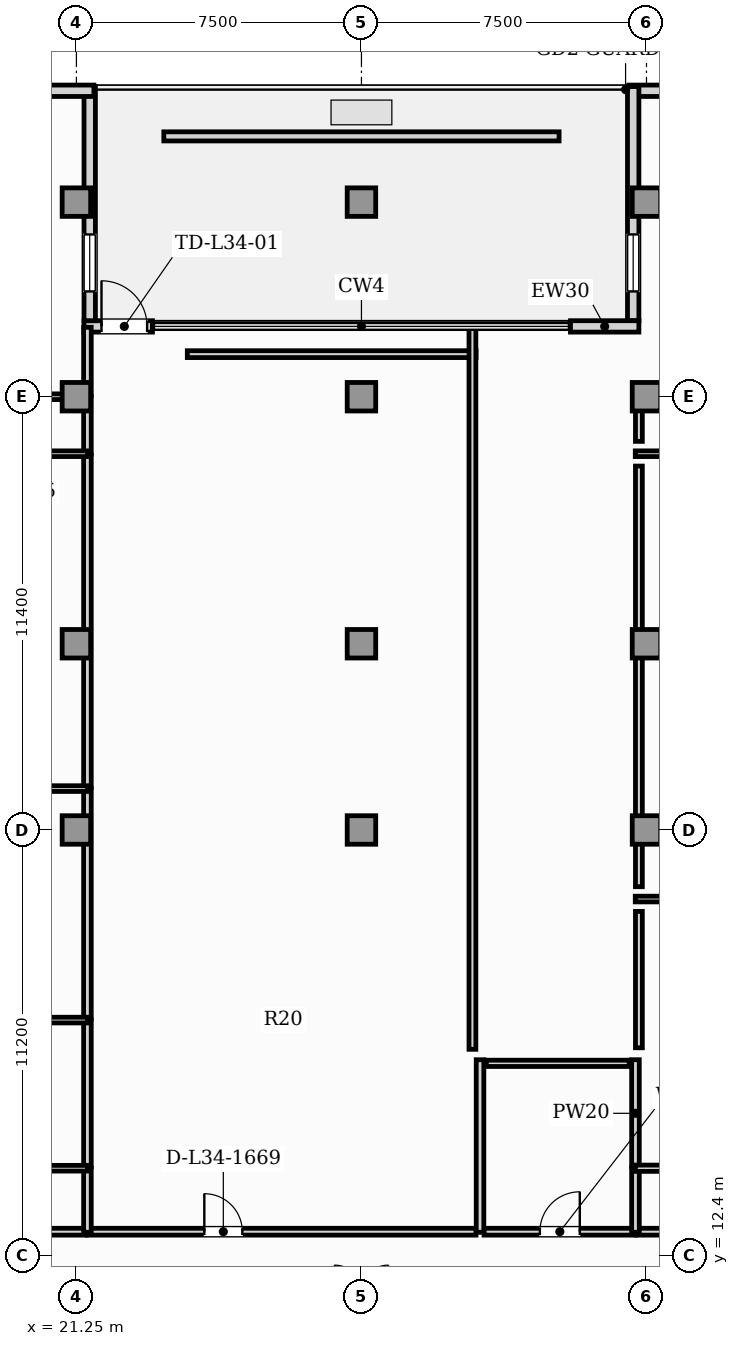
"""IFC4 building model, lengths in metres.
Left out: names, types, materials, properties, quantities, classifications, styles, units other than length and angle.
Written with IfcOpenShell. Run it as: python <this file> out.ifc"""

import sys

from ifc_helpers import new_model, si_unit, direction, frame, frame_2d, origin, origin_2d, place, context, subcontext, project, spatial, rectangle, extrude, element, fill, save


model = new_model("IFC4")
c1 = context("Model", 3, precision=1e-05, world=origin(), true_north=direction((0.0, 1.0)))
c2 = subcontext(c1, "Body", "Model", "MODEL_VIEW")
j1 = project(units=[si_unit("LENGTHUNIT", "METRE"), si_unit("PLANEANGLEUNIT", "RADIAN")], contexts=[c1])
p1 = place(None, origin())
s1 = spatial("IfcSite", under=j1, at=p1, CompositionType="ELEMENT")
p2 = place(p1, origin())
s2 = spatial("IfcBuilding", under=s1, at=p2, CompositionType="ELEMENT")
p3 = place(p2, frame((0.0, 0.0, 140.15)))
s3 = spatial("IfcBuildingStorey", under=s2, at=p3, CompositionType="ELEMENT", Elevation=140.15)
for number, where, z_axis, x_axis in (
    (1, (21.25, 23.6, 0.0), (0.0, 0.0, 1.0), (1.0, 0.0, 0.0)),
    (2, (28.75, 23.6, 0.0), (0.0, 0.0, 1.0), (1.0, 0.0, 0.0)),
    (3, (36.25, 23.6, 0.0), (0.0, 0.0, 1.0), (1.0, 0.0, 0.0)),
    (4, (21.25, 28.5, 0.0), (0.0, 0.0, 1.0), (1.0, 0.0, 0.0)),
    (5, (28.75, 28.5, 0.0), (0.0, 0.0, 1.0), (1.0, 0.0, 0.0)),
    (6, (36.25, 28.5, 0.0), (0.0, 0.0, 1.0), (1.0, 0.0, 0.0)),
    (7, (21.25, 40.12, 0.0), (0.0, 0.0, 1.0), (1.0, 0.0, 0.0)),
    (8, (28.75, 40.12, 0.0), (0.0, 0.0, 1.0), (1.0, 0.0, 0.0)),
    (9, (36.25, 40.12, 0.0), (0.0, 0.0, 1.0), (1.0, 0.0, 0.0)),
    (10, (21.25, 35.0, 0.0), (0.0, 0.0, 1.0), (1.0, 0.0, 0.0)),
    (11, (28.75, 35.0, 0.0), (0.0, 0.0, 1.0), (1.0, 0.0, 0.0)),
    (12, (36.25, 35.0, 0.0), (0.0, 0.0, 1.0), (1.0, 0.0, 0.0)),
):
    element("IfcColumn", number, at=place(p3, frame(where, z_axis=z_axis, x_axis=x_axis)), inside=s3, PredefinedType="COLUMN", context=c2, shape_type="SweptSolid", body=[
        extrude(rectangle(XDim=0.75, YDim=0.75, at=origin_2d()), origin(), (0.0, 0.0, 1.0), 5.05),
    ])
p4 = place(p3, frame((36.99, 43.05, 0.0), z_axis=(0.0, 0.0, 1.0), x_axis=(-1.0, 0.0, 0.0)))
e13 = element("IfcWall", 13, at=p4, inside=s3, PredefinedType="SOLIDWALL", context=c2, shape_type="SweptSolid", body=[
    extrude(rectangle(XDim=1.2, YDim=0.3, at=frame_2d((0.6, 0.0))), origin(), (0.0, 0.0, 1.0), 4.83),
])
p5 = place(p3, frame((35.9, 43.16, 0.0), z_axis=(0.0, 0.0, 1.0), x_axis=(0.0, -1.0, 0.0)))
e14 = element("IfcWall", 14, at=p5, inside=s3, PredefinedType="SOLIDWALL", context=c2, shape_type="SweptSolid", body=[
    extrude(rectangle(XDim=6.16, YDim=0.3, at=frame_2d((3.08, 0.0))), origin(), (0.0, 0.0, 1.0), 4.83),
])
p6 = place(p5, frame((3.89, 0.0, 0.9)))
e15 = element("IfcOpeningElement", 15, at=p6, cuts=e14, PredefinedType="OPENING", context=c2, shape_type="SweptSolid", body=[
    extrude(rectangle(XDim=1.5, YDim=1.95, at=frame_2d((0.75, 0.975))), frame((0.0, 0.16, 0.0), z_axis=(0.0, -1.0, 0.0), x_axis=(1.0, 0.0, 0.0)), (0.0, 0.0, 1.0), 0.32),
])
p7 = place(p3, frame((21.45, 36.85, 0.0), z_axis=(0.0, 0.0, 1.0), x_axis=(1.0, 0.0, 0.0)))
e16 = element("IfcWall", 16, at=p7, inside=s3, PredefinedType="SOLIDWALL", context=c2, shape_type="SweptSolid", body=[
    extrude(rectangle(XDim=1.8, YDim=0.3, at=frame_2d((0.9, 0.0))), origin(), (0.0, 0.0, 1.0), 4.83),
])
p8 = place(p7, frame((0.46, 0.0, 0.0)))
e17 = element("IfcOpeningElement", 17, at=p8, cuts=e16, PredefinedType="OPENING", context=c2, shape_type="SweptSolid", body=[
    extrude(rectangle(XDim=1.2, YDim=2.2, at=frame_2d((0.6, 1.1))), frame((0.0, 0.16, 0.0), z_axis=(0.0, -1.0, 0.0), x_axis=(1.0, 0.0, 0.0)), (0.0, 0.0, 1.0), 0.32),
])
p9 = place(p3, frame((34.25, 36.85, 0.0), z_axis=(0.0, 0.0, 1.0), x_axis=(1.0, 0.0, 0.0)))
e18 = element("IfcWall", 18, at=p9, inside=s3, PredefinedType="SOLIDWALL", context=c2, shape_type="SweptSolid", body=[
    extrude(rectangle(XDim=1.8, YDim=0.3, at=frame_2d((0.9, 0.0))), origin(), (0.0, 0.0, 1.0), 4.83),
])
p10 = place(p3, frame((21.6, 37.0, 0.0), z_axis=(0.0, 0.0, 1.0), x_axis=(0.0, 1.0, 0.0)))
e19 = element("IfcWall", 19, at=p10, inside=s3, PredefinedType="SOLIDWALL", context=c2, shape_type="SweptSolid", body=[
    extrude(rectangle(XDim=6.16, YDim=0.3, at=frame_2d((3.08, 0.0))), origin(), (0.0, 0.0, 1.0), 4.83),
])
p11 = place(p10, frame((0.77, 0.0, 0.9)))
e20 = element("IfcOpeningElement", 20, at=p11, cuts=e19, PredefinedType="OPENING", context=c2, shape_type="SweptSolid", body=[
    extrude(rectangle(XDim=1.5, YDim=1.95, at=frame_2d((0.75, 0.975))), frame((0.0, 0.16, 0.0), z_axis=(0.0, -1.0, 0.0), x_axis=(1.0, 0.0, 0.0)), (0.0, 0.0, 1.0), 0.32),
])
p12 = place(p3, frame((21.71, 43.05, 0.0), z_axis=(0.0, 0.0, 1.0), x_axis=(-1.0, 0.0, 0.0)))
e21 = element("IfcWall", 21, at=p12, inside=s3, PredefinedType="SOLIDWALL", context=c2, shape_type="SweptSolid", body=[
    extrude(rectangle(XDim=15.87, YDim=0.3, at=frame_2d((7.935, 0.0))), origin(), (0.0, 0.0, 1.0), 4.83),
])
p13 = place(p12, frame((13.6, 0.0, 0.9)))
e22 = element("IfcOpeningElement", 22, at=p13, cuts=e21, PredefinedType="OPENING", context=c2, shape_type="SweptSolid", body=[
    extrude(rectangle(XDim=1.5, YDim=1.95, at=frame_2d((0.75, 0.975))), frame((0.0, 0.16, 0.0), z_axis=(0.0, -1.0, 0.0), x_axis=(1.0, 0.0, 0.0)), (0.0, 0.0, 1.0), 0.32),
])
p14 = place(p12, frame((9.699, 0.0, 0.9)))
e23 = element("IfcOpeningElement", 23, at=p14, cuts=e21, PredefinedType="OPENING", context=c2, shape_type="SweptSolid", body=[
    extrude(rectangle(XDim=1.5, YDim=1.95, at=frame_2d((0.75, 0.975))), frame((0.0, 0.16, 0.0), z_axis=(0.0, -1.0, 0.0), x_axis=(1.0, 0.0, 0.0)), (0.0, 0.0, 1.0), 0.32),
])
p15 = place(p12, frame((5.218, 0.0, 0.9)))
e24 = element("IfcOpeningElement", 24, at=p15, cuts=e21, PredefinedType="OPENING", context=c2, shape_type="SweptSolid", body=[
    extrude(rectangle(XDim=1.5, YDim=1.95, at=frame_2d((0.75, 0.975))), frame((0.0, 0.16, 0.0), z_axis=(0.0, -1.0, 0.0), x_axis=(1.0, 0.0, 0.0)), (0.0, 0.0, 1.0), 0.32),
])
p16 = place(p3, frame((23.55, 41.85, 0.0), z_axis=(0.0, 0.0, 1.0), x_axis=(1.0, 0.0, 0.0)))
e25 = element("IfcWall", 25, at=p16, inside=s3, PredefinedType="PARAPET", context=c2, shape_type="SweptSolid", body=[
    extrude(rectangle(XDim=10.4, YDim=0.24, at=frame_2d((5.2, 0.0))), origin(), (0.0, 0.0, 1.0), 0.55),
])
p17 = place(p3, frame((21.535, 13.03, 0.0), z_axis=(0.0, 0.0, 1.0), x_axis=(1.0, 0.0, 0.0)))
e26 = element("IfcWall", 26, at=p17, inside=s3, PredefinedType="PARTITIONING", context=c2, shape_type="SweptSolid", body=[
    extrude(rectangle(XDim=10.23, YDim=0.18, at=frame_2d((5.115, 0.0))), origin(), (0.0, 0.0, 1.0), 4.83),
])
p18 = place(p17, frame((3.081, 0.0, 0.0)))
e27 = element("IfcOpeningElement", 27, at=p18, cuts=e26, PredefinedType="OPENING", context=c2, shape_type="SweptSolid", body=[
    extrude(rectangle(XDim=1.0, YDim=2.15, at=frame_2d((0.5, 1.075))), frame((0.0, 0.1, 0.0), z_axis=(0.0, -1.0, 0.0), x_axis=(1.0, 0.0, 0.0)), (0.0, 0.0, 1.0), 0.2),
])
p19 = place(p3, frame((31.975, 13.03, 0.0), z_axis=(0.0, 0.0, 1.0), x_axis=(1.0, 0.0, 0.0)))
e28 = element("IfcWall", 28, at=p19, inside=s3, PredefinedType="PARTITIONING", context=c2, shape_type="SweptSolid", body=[
    extrude(rectangle(XDim=3.99, YDim=0.18, at=frame_2d((1.995, 0.0))), origin(), (0.0, 0.0, 1.0), 4.83),
])
p20 = place(p19, frame((1.47, 0.0, 0.0)))
e29 = element("IfcOpeningElement", 29, at=p20, cuts=e28, PredefinedType="OPENING", context=c2, shape_type="SweptSolid", body=[
    extrude(rectangle(XDim=1.05, YDim=2.15, at=frame_2d((0.525, 1.075))), frame((0.0, 0.1, 0.0), z_axis=(0.0, -1.0, 0.0), x_axis=(1.0, 0.0, 0.0)), (0.0, 0.0, 1.0), 0.2),
])
p21 = place(p3, frame((15.085, 13.03, 0.0), z_axis=(0.0, 0.0, 1.0), x_axis=(1.0, 0.0, 0.0)))
e30 = element("IfcWall", 30, at=p21, inside=s3, PredefinedType="PARTITIONING", context=c2, shape_type="SweptSolid", body=[
    extrude(rectangle(XDim=6.42, YDim=0.18, at=frame_2d((3.21, 0.0))), origin(), (0.0, 0.0, 1.0), 4.83),
])
p22 = place(p3, frame((35.995, 13.03, 0.0), z_axis=(0.0, 0.0, 1.0), x_axis=(1.0, 0.0, 0.0)))
e31 = element("IfcWall", 31, at=p22, inside=s3, PredefinedType="PARTITIONING", context=c2, shape_type="SweptSolid", body=[
    extrude(rectangle(XDim=6.495, YDim=0.18, at=frame_2d((3.248, 0.0))), origin(), (0.0, 0.0, 1.0), 4.83),
])
p23 = place(p3, frame((31.87, 13.015, 0.0), z_axis=(0.0, 0.0, 1.0), x_axis=(0.0, 1.0, 0.0)))
e32 = element("IfcWall", 32, at=p23, inside=s3, PredefinedType="PARTITIONING", context=c2, shape_type="SweptSolid", body=[
    extrude(rectangle(XDim=4.54, YDim=0.2, at=frame_2d((2.27, 0.0))), origin(), (0.0, 0.0, 1.0), 4.83),
])
p24 = place(p3, frame((21.54, 33.495, 0.0), z_axis=(0.0, 0.0, 1.0), x_axis=(0.0, 1.0, 0.0)))
e33 = element("IfcWall", 33, at=p24, inside=s3, PredefinedType="PARTITIONING", context=c2, shape_type="SweptSolid", body=[
    extrude(rectangle(XDim=1.51, YDim=0.2, at=frame_2d((0.755, 0.0))), origin(), (0.0, 0.0, 1.0), 4.83),
])
p25 = place(p3, frame((21.54, 13.015, 0.0), z_axis=(0.0, 0.0, 1.0), x_axis=(0.0, 1.0, 0.0)))
e34 = element("IfcWall", 34, at=p25, inside=s3, PredefinedType="PARTITIONING", context=c2, shape_type="SweptSolid", body=[
    extrude(rectangle(XDim=1.69, YDim=0.2, at=frame_2d((0.845, 0.0))), origin(), (0.0, 0.0, 1.0), 4.83),
])
p26 = place(p3, frame((21.54, 14.735, 0.0), z_axis=(0.0, 0.0, 1.0), x_axis=(0.0, 1.0, 0.0)))
e35 = element("IfcWall", 35, at=p26, inside=s3, PredefinedType="PARTITIONING", context=c2, shape_type="SweptSolid", body=[
    extrude(rectangle(XDim=3.868, YDim=0.2, at=frame_2d((1.934, 0.0))), origin(), (0.0, 0.0, 1.0), 4.83),
])
p27 = place(p3, frame((21.54, 18.633, 0.0), z_axis=(0.0, 0.0, 1.0), x_axis=(0.0, 1.0, 0.0)))
e36 = element("IfcWall", 36, at=p27, inside=s3, PredefinedType="PARTITIONING", context=c2, shape_type="SweptSolid", body=[
    extrude(rectangle(XDim=6.061, YDim=0.2, at=frame_2d((3.03, 0.0))), origin(), (0.0, 0.0, 1.0), 4.83),
])
p28 = place(p3, frame((21.54, 24.724, 0.0), z_axis=(0.0, 0.0, 1.0), x_axis=(0.0, 1.0, 0.0)))
e37 = element("IfcWall", 37, at=p28, inside=s3, PredefinedType="PARTITIONING", context=c2, shape_type="SweptSolid", body=[
    extrude(rectangle(XDim=8.741, YDim=0.2, at=frame_2d((4.371, 0.0))), origin(), (0.0, 0.0, 1.0), 4.83),
])
p29 = place(p3, frame((21.54, 35.035, 0.0), z_axis=(0.0, 0.0, 1.0), x_axis=(0.0, 1.0, 0.0)))
e38 = element("IfcWall", 38, at=p29, inside=s3, PredefinedType="PARTITIONING", context=c2, shape_type="SweptSolid", body=[
    extrude(rectangle(XDim=1.792, YDim=0.2, at=frame_2d((0.896, 0.0))), origin(), (0.0, 0.0, 1.0), 4.83),
])
p30 = place(p3, frame((35.96, 13.015, 0.0), z_axis=(0.0, 0.0, 1.0), x_axis=(0.0, 1.0, 0.0)))
e39 = element("IfcWall", 39, at=p30, inside=s3, PredefinedType="PARTITIONING", context=c2, shape_type="SweptSolid", body=[
    extrude(rectangle(XDim=1.69, YDim=0.2, at=frame_2d((0.845, 0.0))), origin(), (0.0, 0.0, 1.0), 4.83),
])
p31 = place(p3, frame((35.96, 14.735, 0.0), z_axis=(0.0, 0.0, 1.0), x_axis=(0.0, 1.0, 0.0)))
e40 = element("IfcWall", 40, at=p31, inside=s3, PredefinedType="PARTITIONING", context=c2, shape_type="SweptSolid", body=[
    extrude(rectangle(XDim=2.82, YDim=0.2, at=frame_2d((1.41, 0.0))), origin(), (0.0, 0.0, 1.0), 4.83),
])
p32 = place(p3, frame((15.045, 33.5, 0.0), z_axis=(0.0, 0.0, 1.0), x_axis=(1.0, 0.0, 0.0)))
e41 = element("IfcWall", 41, at=p32, inside=s3, PredefinedType="PARTITIONING", context=c2, shape_type="SweptSolid", body=[
    extrude(rectangle(XDim=6.5, YDim=0.15, at=frame_2d((3.25, 0.0))), origin(), (0.0, 0.0, 1.0), 4.83),
])
p33 = place(p3, frame((17.769, 35.0, 0.0), z_axis=(0.0, 0.0, 1.0), x_axis=(1.0, 0.0, 0.0)))
e42 = element("IfcWall", 42, at=p33, inside=s3, PredefinedType="PARTITIONING", context=c2, shape_type="SweptSolid", body=[
    extrude(rectangle(XDim=3.776, YDim=0.15, at=frame_2d((1.888, 0.0))), origin(), (0.0, 0.0, 1.0), 4.213),
])
p34 = place(p33, frame((1.428, 0.0, 0.0)))
e43 = element("IfcOpeningElement", 43, at=p34, cuts=e42, PredefinedType="OPENING", context=c2, shape_type="SweptSolid", body=[
    extrude(rectangle(XDim=0.92, YDim=2.1, at=frame_2d((0.46, 1.05))), frame((0.0, 0.085, 0.0), z_axis=(0.0, -1.0, 0.0), x_axis=(1.0, 0.0, 0.0)), (0.0, 0.0, 1.0), 0.17),
])
for number, where, z_axis, x_axis in (
    (44, (15.045, 14.7, 0.0), (0.0, 0.0, 1.0), (1.0, 0.0, 0.0)),
    (45, (15.045, 18.598, 0.0), (0.0, 0.0, 1.0), (1.0, 0.0, 0.0)),
    (46, (15.045, 24.689, 0.0), (0.0, 0.0, 1.0), (1.0, 0.0, 0.0)),
):
    element("IfcWall", number, at=place(p3, frame(where, z_axis=z_axis, x_axis=x_axis)), inside=s3, PredefinedType="PARTITIONING", context=c2, shape_type="SweptSolid", body=[
        extrude(rectangle(XDim=6.5, YDim=0.15, at=frame_2d((3.25, 0.0))), origin(), (0.0, 0.0, 1.0), 4.83),
    ])
p35 = place(p3, frame((35.955, 33.5, 0.0), z_axis=(0.0, 0.0, 1.0), x_axis=(1.0, 0.0, 0.0)))
e47 = element("IfcWall", 47, at=p35, inside=s3, PredefinedType="PARTITIONING", context=c2, shape_type="SweptSolid", body=[
    extrude(rectangle(XDim=6.575, YDim=0.15, at=frame_2d((3.288, 0.0))), origin(), (0.0, 0.0, 1.0), 4.83),
])
p36 = place(p3, frame((35.955, 35.0, 0.0), z_axis=(0.0, 0.0, 1.0), x_axis=(1.0, 0.0, 0.0)))
e48 = element("IfcWall", 48, at=p36, inside=s3, PredefinedType="PARTITIONING", context=c2, shape_type="SweptSolid", body=[
    extrude(rectangle(XDim=5.353, YDim=0.15, at=frame_2d((2.676, 0.0))), origin(), (0.0, 0.0, 1.0), 4.213),
])
p37 = place(p36, frame((2.216, 0.0, 0.0)))
e49 = element("IfcOpeningElement", 49, at=p37, cuts=e48, PredefinedType="OPENING", context=c2, shape_type="SweptSolid", body=[
    extrude(rectangle(XDim=0.92, YDim=2.1, at=frame_2d((0.46, 1.05))), frame((0.0, 0.085, 0.0), z_axis=(0.0, -1.0, 0.0), x_axis=(1.0, 0.0, 0.0)), (0.0, 0.0, 1.0), 0.17),
])
p38 = place(p3, frame((35.955, 14.7, 0.0), z_axis=(0.0, 0.0, 1.0), x_axis=(1.0, 0.0, 0.0)))
e50 = element("IfcWall", 50, at=p38, inside=s3, PredefinedType="PLUMBINGWALL", context=c2, shape_type="SweptSolid", body=[
    extrude(rectangle(XDim=6.575, YDim=0.165, at=frame_2d((3.288, 0.0))), origin(), (0.0, 0.0, 1.0), 4.83),
])
p39 = place(p3, frame((35.955, 21.783, 0.0), z_axis=(0.0, 0.0, 1.0), x_axis=(1.0, 0.0, 0.0)))
e51 = element("IfcWall", 51, at=p39, inside=s3, PredefinedType="PARTITIONING", context=c2, shape_type="SweptSolid", body=[
    extrude(rectangle(XDim=6.575, YDim=0.15, at=frame_2d((3.288, 0.0))), origin(), (0.0, 0.0, 1.0), 4.83),
])
p40 = place(p3, frame((24.168, 36.12, 0.0), z_axis=(0.0, 0.0, 1.0), x_axis=(1.0, 0.0, 0.0)))
e52 = element("IfcWall", 52, at=p40, inside=s3, PredefinedType="PARTITIONING", context=c2, shape_type="SweptSolid", body=[
    extrude(rectangle(XDim=7.597, YDim=0.18, at=frame_2d((3.798, 0.0))), origin(), (0.0, 0.0, 1.0), 4.83),
])
p41 = place(p3, frame((31.67, 36.832, 0.0), z_axis=(0.0, 0.0, 1.0), x_axis=(0.0, -1.0, 0.0)))
e53 = element("IfcWall", 53, at=p41, inside=s3, PredefinedType="PARTITIONING", context=c2, shape_type="SweptSolid", body=[
    extrude(rectangle(XDim=19.003, YDim=0.18, at=frame_2d((9.501, 0.0))), origin(), (0.0, 0.0, 1.0), 4.83),
])
p42 = place(p3, frame((32.035, 17.46, 0.0), z_axis=(0.0, 0.0, 1.0), x_axis=(1.0, 0.0, 0.0)))
e54 = element("IfcWall", 54, at=p42, inside=s3, PredefinedType="PLUMBINGWALL", context=c2, shape_type="SweptSolid", body=[
    extrude(rectangle(XDim=3.76, YDim=0.165, at=frame_2d((1.88, 0.0))), origin(), (0.0, 0.0, 1.0), 4.83),
])
p43 = place(p3, frame((36.05, 33.825, 0.0), z_axis=(0.0, 0.0, 1.0), x_axis=(0.0, 1.0, 0.0)))
e55 = element("IfcWall", 55, at=p43, inside=s3, PredefinedType="PARTITIONING", context=c2, shape_type="SweptSolid", body=[
    extrude(rectangle(XDim=0.85, YDim=0.18, at=frame_2d((0.425, 0.0))), origin(), (0.0, 0.0, 1.0), 4.83),
])
p44 = place(p3, frame((36.05, 17.87, 0.0), z_axis=(0.0, 0.0, 1.0), x_axis=(0.0, 1.0, 0.0)))
e56 = element("IfcWall", 56, at=p44, inside=s3, PredefinedType="PARTITIONING", context=c2, shape_type="SweptSolid", body=[
    extrude(rectangle(XDim=3.588, YDim=0.18, at=frame_2d((1.794, 0.0))), origin(), (0.0, 0.0, 1.0), 4.377),
])
p45 = place(p3, frame((36.05, 22.108, 0.0), z_axis=(0.0, 0.0, 1.0), x_axis=(0.0, 1.0, 0.0)))
e57 = element("IfcWall", 57, at=p45, inside=s3, PredefinedType="PARTITIONING", context=c2, shape_type="SweptSolid", body=[
    extrude(rectangle(XDim=11.067, YDim=0.18, at=frame_2d((5.534, 0.0))), origin(), (0.0, 0.0, 1.0), 4.377),
])
p46 = place(p8, origin())
e58 = element("IfcDoor", 58, at=p46, inside=s3, OperationType="SINGLE_SWING_LEFT", PredefinedType="DOOR", context=c2, shape_type="SweptSolid", body=[
    extrude(rectangle(XDim=1.2, YDim=2.2, at=frame_2d((0.6, 1.1))), frame((0.0, 0.025, 0.0), z_axis=(0.0, -1.0, 0.0), x_axis=(1.0, 0.0, 0.0)), (0.0, 0.0, 1.0), 0.05),
])
fill(e17, e58)
p47 = place(p11, origin())
e59 = element("IfcWindow", 59, at=p47, inside=s3, PartitioningType="SINGLE_PANEL", PredefinedType="WINDOW", context=c2, shape_type="SweptSolid", body=[
    extrude(rectangle(XDim=1.5, YDim=1.95, at=frame_2d((0.75, 0.975))), frame((0.0, 0.03, 0.0), z_axis=(0.0, -1.0, 0.0), x_axis=(1.0, 0.0, 0.0)), (0.0, 0.0, 1.0), 0.06),
])
fill(e20, e59)
p48 = place(p6, origin())
e60 = element("IfcWindow", 60, at=p48, inside=s3, PartitioningType="SINGLE_PANEL", PredefinedType="WINDOW", context=c2, shape_type="SweptSolid", body=[
    extrude(rectangle(XDim=1.5, YDim=1.95, at=frame_2d((0.75, 0.975))), frame((0.0, 0.03, 0.0), z_axis=(0.0, -1.0, 0.0), x_axis=(1.0, 0.0, 0.0)), (0.0, 0.0, 1.0), 0.06),
])
fill(e15, e60)
p49 = place(p18, origin())
e61 = element("IfcDoor", 61, at=p49, inside=s3, OperationType="SINGLE_SWING_LEFT", PredefinedType="DOOR", context=c2, shape_type="SweptSolid", body=[
    extrude(rectangle(XDim=1.0, YDim=2.15, at=frame_2d((0.5, 1.075))), frame((0.0, 0.025, 0.0), z_axis=(0.0, -1.0, 0.0), x_axis=(1.0, 0.0, 0.0)), (0.0, 0.0, 1.0), 0.05),
])
fill(e27, e61)
p50 = place(p20, origin())
e62 = element("IfcDoor", 62, at=p50, inside=s3, OperationType="SINGLE_SWING_RIGHT", PredefinedType="DOOR", context=c2, shape_type="SweptSolid", body=[
    extrude(rectangle(XDim=1.05, YDim=2.15, at=frame_2d((0.525, 1.075))), frame((0.0, 0.025, 0.0), z_axis=(0.0, -1.0, 0.0), x_axis=(1.0, 0.0, 0.0)), (0.0, 0.0, 1.0), 0.05),
])
fill(e29, e62)
save(model, sys.argv[1])
